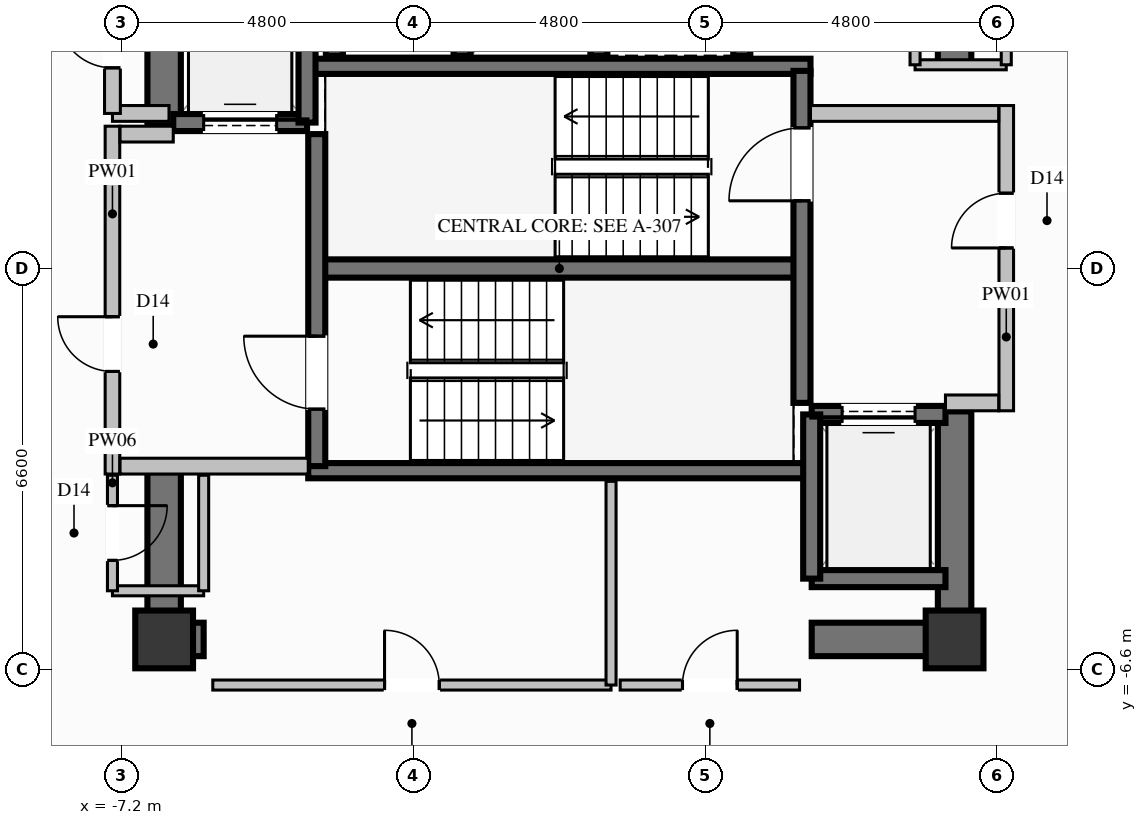
"""IFC4 building model, lengths in metres.
Left out: names, types, materials, properties, quantities, classifications, styles, units other than length and angle.
Written with IfcOpenShell. Run it as: python <this file> out.ifc"""

import sys

from ifc_helpers import new_model, si_unit, direction, frame, frame_2d, origin, origin_2d, place, context, subcontext, project, spatial, rectangle, extrude, element, fill, save


model = new_model("IFC4")
c1 = context("Model", 3, precision=1e-05, world=origin(), true_north=direction((0.0, 1.0)))
c2 = subcontext(c1, "Body", "Model", "MODEL_VIEW")
j1 = project(units=[si_unit("LENGTHUNIT", "METRE"), si_unit("PLANEANGLEUNIT", "RADIAN")], contexts=[c1])
p1 = place(None, origin())
s1 = spatial("IfcSite", under=j1, at=p1, CompositionType="ELEMENT")
p2 = place(p1, origin())
s2 = spatial("IfcBuilding", under=s1, at=p2, CompositionType="ELEMENT")
p3 = place(p2, frame((0.0, 0.0, 230.8)))
s3 = spatial("IfcBuildingStorey", under=s2, at=p3, CompositionType="ELEMENT", Elevation=230.8)
for number, where, z_axis, x_axis in (
    (1, (-6.5, -6.1, 0.0), (0.0, 0.0, 1.0), (1.0, 0.0, 0.0)),
    (2, (6.5, -6.1, 0.0), (0.0, 0.0, 1.0), (1.0, 0.0, 0.0)),
):
    element("IfcColumn", number, at=place(p3, frame(where, z_axis=z_axis, x_axis=x_axis)), inside=s3, PredefinedType="COLUMN", context=c2, shape_type="SweptSolid", body=[
        extrude(rectangle(XDim=0.95, YDim=0.95, at=origin_2d()), origin(), (0.0, 0.0, 1.0), 3.6),
    ])
p4 = place(p3, frame((-3.99, 0.0, 0.0), z_axis=(0.0, 0.0, 1.0), x_axis=(1.0, 0.0, 0.0)))
e3 = element("IfcWall", 3, at=p4, inside=s3, PredefinedType="SHEAR", context=c2, shape_type="SweptSolid", body=[
    extrude(rectangle(XDim=7.98, YDim=0.3, at=frame_2d((3.99, 0.0))), origin(), (0.0, 0.0, 1.0), 3.6),
])
for number, where, z_axis, x_axis in (
    (4, (-4.13, -3.325, 0.0), (0.0, 0.0, 1.0), (1.0, 0.0, 0.0)),
    (5, (-4.13, 3.325, 0.0), (0.0, 0.0, 1.0), (1.0, 0.0, 0.0)),
):
    element("IfcWall", number, at=place(p3, frame(where, z_axis=z_axis, x_axis=x_axis)), inside=s3, PredefinedType="SOLIDWALL", context=c2, shape_type="SweptSolid", body=[
        extrude(rectangle(XDim=8.26, YDim=0.25, at=frame_2d((4.13, 0.0))), origin(), (0.0, 0.0, 1.0), 3.6),
    ])
p5 = place(p3, frame((-6.225, -6.1, 0.0), z_axis=(0.0, 0.0, 1.0), x_axis=(1.0, 0.0, 0.0)))
e6 = element("IfcWall", 6, at=p5, inside=s3, PredefinedType="SHEAR", context=c2, shape_type="SweptSolid", body=[
    extrude(rectangle(XDim=0.375, YDim=0.55, at=frame_2d((0.188, 0.0))), origin(), (0.0, 0.0, 1.0), 3.6),
])
p6 = place(p3, frame((4.15, -6.1, 0.0), z_axis=(0.0, 0.0, 1.0), x_axis=(1.0, 0.0, 0.0)))
e7 = element("IfcWall", 7, at=p6, inside=s3, PredefinedType="SHEAR", context=c2, shape_type="SweptSolid", body=[
    extrude(rectangle(XDim=2.075, YDim=0.55, at=frame_2d((1.038, 0.0))), origin(), (0.0, 0.0, 1.0), 3.6),
])
p7 = place(p3, frame((-6.5, 2.35, 0.0), z_axis=(0.0, 0.0, 1.0), x_axis=(0.0, 1.0, 0.0)))
e8 = element("IfcWall", 8, at=p7, inside=s3, PredefinedType="SHEAR", context=c2, shape_type="SweptSolid", body=[
    extrude(rectangle(XDim=4.025, YDim=0.55, at=frame_2d((2.012, 0.0))), origin(), (0.0, 0.0, 1.0), 3.6),
])
p8 = place(p3, frame((-6.5, -6.375, 0.0), z_axis=(0.0, 0.0, 1.0), x_axis=(0.0, 1.0, 0.0)))
e9 = element("IfcWall", 9, at=p8, inside=s3, PredefinedType="SHEAR", context=c2, shape_type="SweptSolid", body=[
    extrude(rectangle(XDim=3.025, YDim=0.55, at=frame_2d((1.512, 0.0))), origin(), (0.0, 0.0, 1.0), 3.6),
])
p9 = place(p3, frame((6.5, -6.375, 0.0), z_axis=(0.0, 0.0, 1.0), x_axis=(0.0, 1.0, 0.0)))
e10 = element("IfcWall", 10, at=p9, inside=s3, PredefinedType="SHEAR", context=c2, shape_type="SweptSolid", body=[
    extrude(rectangle(XDim=4.025, YDim=0.55, at=frame_2d((2.012, 0.0))), origin(), (0.0, 0.0, 1.0), 3.6),
])
p10 = place(p3, frame((6.5, 3.35, 0.0), z_axis=(0.0, 0.0, 1.0), x_axis=(0.0, 1.0, 0.0)))
e11 = element("IfcWall", 11, at=p10, inside=s3, PredefinedType="SHEAR", context=c2, shape_type="SweptSolid", body=[
    extrude(rectangle(XDim=3.025, YDim=0.55, at=frame_2d((1.512, 0.0))), origin(), (0.0, 0.0, 1.0), 3.6),
])
for number, where, z_axis, x_axis in (
    (12, (-3.7, 6.0, 0.0), (0.0, 0.0, 1.0), (0.0, -1.0, 0.0)),
    (13, (-1.6, 3.5, 0.0), (0.0, 0.0, 1.0), (0.0, 1.0, 0.0)),
    (14, (0.65, 3.5, 0.0), (0.0, 0.0, 1.0), (0.0, 1.0, 0.0)),
    (15, (3.0, 3.5, 0.0), (0.0, 0.0, 1.0), (0.0, 1.0, 0.0)),
):
    element("IfcWall", number, at=place(p3, frame(where, z_axis=z_axis, x_axis=x_axis)), inside=s3, PredefinedType="SOLIDWALL", context=c2, shape_type="SweptSolid", body=[
        extrude(rectangle(XDim=2.5, YDim=0.28, at=frame_2d((1.25, 0.0))), origin(), (0.0, 0.0, 1.0), 3.2),
    ])
p11 = place(p3, frame((-6.35, 2.4, 0.0), z_axis=(0.0, 0.0, 1.0), x_axis=(1.0, 0.0, 0.0)))
e16 = element("IfcWall", 16, at=p11, inside=s3, PredefinedType="SOLIDWALL", context=c2, shape_type="SweptSolid", body=[
    extrude(rectangle(XDim=2.2, YDim=0.28, at=frame_2d((1.1, 0.0))), origin(), (0.0, 0.0, 1.0), 3.2),
])
p12 = place(p11, frame((0.5, 0.0, 0.0)))
e17 = element("IfcOpeningElement", 17, at=p12, cuts=e16, PredefinedType="OPENING", context=c2, shape_type="SweptSolid", body=[
    extrude(rectangle(XDim=1.2, YDim=2.2, at=frame_2d((0.6, 1.1))), frame((0.0, 0.15, 0.0), z_axis=(0.0, -1.0, 0.0), x_axis=(1.0, 0.0, 0.0)), (0.0, 0.0, 1.0), 0.3),
])
p13 = place(p3, frame((-4.15, 2.4, 0.0), z_axis=(0.0, 0.0, 1.0), x_axis=(0.0, 1.0, 0.0)))
e18 = element("IfcWall", 18, at=p13, inside=s3, PredefinedType="SOLIDWALL", context=c2, shape_type="SweptSolid", body=[
    extrude(rectangle(XDim=2.7, YDim=0.28, at=frame_2d((1.35, 0.0))), origin(), (0.0, 0.0, 1.0), 3.2),
])
p14 = place(p3, frame((4.15, -5.1, 0.0), z_axis=(0.0, 0.0, 1.0), x_axis=(1.0, 0.0, 0.0)))
e19 = element("IfcWall", 19, at=p14, inside=s3, PredefinedType="SOLIDWALL", context=c2, shape_type="SweptSolid", body=[
    extrude(rectangle(XDim=2.2, YDim=0.28, at=frame_2d((1.1, 0.0))), origin(), (0.0, 0.0, 1.0), 3.2),
])
p15 = place(p3, frame((6.35, -2.4, 0.0), z_axis=(0.0, 0.0, 1.0), x_axis=(-1.0, 0.0, 0.0)))
e20 = element("IfcWall", 20, at=p15, inside=s3, PredefinedType="SOLIDWALL", context=c2, shape_type="SweptSolid", body=[
    extrude(rectangle(XDim=2.2, YDim=0.28, at=frame_2d((1.1, 0.0))), origin(), (0.0, 0.0, 1.0), 3.2),
])
p16 = place(p15, frame((0.5, 0.0, 0.0)))
e21 = element("IfcOpeningElement", 21, at=p16, cuts=e20, PredefinedType="OPENING", context=c2, shape_type="SweptSolid", body=[
    extrude(rectangle(XDim=1.2, YDim=2.2, at=frame_2d((0.6, 1.1))), frame((0.0, 0.15, 0.0), z_axis=(0.0, -1.0, 0.0), x_axis=(1.0, 0.0, 0.0)), (0.0, 0.0, 1.0), 0.3),
])
p17 = place(p3, frame((4.15, -2.4, 0.0), z_axis=(0.0, 0.0, 1.0), x_axis=(0.0, -1.0, 0.0)))
e22 = element("IfcWall", 22, at=p17, inside=s3, PredefinedType="SOLIDWALL", context=c2, shape_type="SweptSolid", body=[
    extrude(rectangle(XDim=2.7, YDim=0.28, at=frame_2d((1.35, 0.0))), origin(), (0.0, 0.0, 1.0), 3.2),
])
p18 = place(p3, frame((-3.99, -3.25, 0.0), z_axis=(0.0, 0.0, 1.0), x_axis=(0.0, 1.0, 0.0)))
e23 = element("IfcWall", 23, at=p18, inside=s3, PredefinedType="SOLIDWALL", context=c2, shape_type="SweptSolid", body=[
    extrude(rectangle(XDim=5.46, YDim=0.28, at=frame_2d((2.73, 0.0))), origin(), (0.0, 0.0, 1.0), 3.2),
])
p19 = place(p18, frame((0.937, 0.0, 0.0)))
e24 = element("IfcOpeningElement", 24, at=p19, cuts=e23, PredefinedType="OPENING", context=c2, shape_type="SweptSolid", body=[
    extrude(rectangle(XDim=1.2, YDim=2.2, at=frame_2d((0.6, 1.1))), frame((0.0, 0.15, 0.0), z_axis=(0.0, -1.0, 0.0), x_axis=(1.0, 0.0, 0.0)), (0.0, 0.0, 1.0), 0.3),
])
p20 = place(p3, frame((3.99, -2.21, 0.0), z_axis=(0.0, 0.0, 1.0), x_axis=(0.0, 1.0, 0.0)))
e25 = element("IfcWall", 25, at=p20, inside=s3, PredefinedType="SOLIDWALL", context=c2, shape_type="SweptSolid", body=[
    extrude(rectangle(XDim=5.46, YDim=0.28, at=frame_2d((2.73, 0.0))), origin(), (0.0, 0.0, 1.0), 3.2),
])
p21 = place(p20, frame((3.323, 0.0, 0.0)))
e26 = element("IfcOpeningElement", 26, at=p21, cuts=e25, PredefinedType="OPENING", context=c2, shape_type="SweptSolid", body=[
    extrude(rectangle(XDim=1.2, YDim=2.2, at=frame_2d((0.6, 1.1))), frame((0.0, 0.15, 0.0), z_axis=(0.0, -1.0, 0.0), x_axis=(1.0, 0.0, 0.0)), (0.0, 0.0, 1.0), 0.3),
])
p22 = place(p3, frame((-7.35, -3.38, 0.0), z_axis=(0.0, 0.0, 1.0), x_axis=(0.0, 1.0, 0.0)))
e27 = element("IfcWall", 27, at=p22, inside=s3, PredefinedType="PARTITIONING", context=c2, shape_type="SweptSolid", body=[
    extrude(rectangle(XDim=5.72, YDim=0.24, at=frame_2d((2.86, 0.0))), origin(), (0.0, 0.0, 1.0), 3.2),
])
p23 = place(p22, frame((1.687, 0.0, 0.0)))
e28 = element("IfcOpeningElement", 28, at=p23, cuts=e27, PredefinedType="OPENING", context=c2, shape_type="SweptSolid", body=[
    extrude(rectangle(XDim=0.9, YDim=2.02, at=frame_2d((0.45, 1.01))), frame((0.0, 0.13, 0.0), z_axis=(0.0, -1.0, 0.0), x_axis=(1.0, 0.0, 0.0)), (0.0, 0.0, 1.0), 0.26),
])
p24 = place(p3, frame((-7.225, -3.25, 0.0), z_axis=(0.0, 0.0, 1.0), x_axis=(1.0, 0.0, 0.0)))
e29 = element("IfcWall", 29, at=p24, inside=s3, PredefinedType="PARTITIONING", context=c2, shape_type="SweptSolid", body=[
    extrude(rectangle(XDim=3.095, YDim=0.26, at=frame_2d((1.548, 0.0))), origin(), (0.0, 0.0, 1.0), 3.2),
])
p25 = place(p3, frame((-7.225, 2.21, 0.0), z_axis=(0.0, 0.0, 1.0), x_axis=(1.0, 0.0, 0.0)))
e30 = element("IfcWall", 30, at=p25, inside=s3, PredefinedType="PARTITIONING", context=c2, shape_type="SweptSolid", body=[
    extrude(rectangle(XDim=0.875, YDim=0.26, at=frame_2d((0.438, 0.0))), origin(), (0.0, 0.0, 1.0), 3.2),
])
p26 = place(p3, frame((7.35, -2.34, 0.0), z_axis=(0.0, 0.0, 1.0), x_axis=(0.0, 1.0, 0.0)))
e31 = element("IfcWall", 31, at=p26, inside=s3, PredefinedType="PARTITIONING", context=c2, shape_type="SweptSolid", body=[
    extrude(rectangle(XDim=5.02, YDim=0.24, at=frame_2d((2.51, 0.0))), origin(), (0.0, 0.0, 1.0), 3.2),
])
p27 = place(p26, frame((2.678, 0.0, 0.0)))
e32 = element("IfcOpeningElement", 32, at=p27, cuts=e31, PredefinedType="OPENING", context=c2, shape_type="SweptSolid", body=[
    extrude(rectangle(XDim=0.9, YDim=2.02, at=frame_2d((0.45, 1.01))), frame((0.0, 0.13, 0.0), z_axis=(0.0, -1.0, 0.0), x_axis=(1.0, 0.0, 0.0)), (0.0, 0.0, 1.0), 0.26),
])
p28 = place(p3, frame((6.35, -2.21, 0.0), z_axis=(0.0, 0.0, 1.0), x_axis=(1.0, 0.0, 0.0)))
e33 = element("IfcWall", 33, at=p28, inside=s3, PredefinedType="PARTITIONING", context=c2, shape_type="SweptSolid", body=[
    extrude(rectangle(XDim=0.875, YDim=0.26, at=frame_2d((0.438, 0.0))), origin(), (0.0, 0.0, 1.0), 3.2),
])
p29 = place(p3, frame((4.13, 2.55, 0.0), z_axis=(0.0, 0.0, 1.0), x_axis=(1.0, 0.0, 0.0)))
e34 = element("IfcWall", 34, at=p29, inside=s3, PredefinedType="PARTITIONING", context=c2, shape_type="SweptSolid", body=[
    extrude(rectangle(XDim=3.095, YDim=0.26, at=frame_2d((1.548, 0.0))), origin(), (0.0, 0.0, 1.0), 3.2),
])
p30 = place(p3, frame((-7.35, 2.55, 0.0), z_axis=(0.0, 0.0, 1.0), x_axis=(1.0, 0.0, 0.0)))
e35 = element("IfcWall", 35, at=p30, inside=s3, PredefinedType="PARTITIONING", context=c2, shape_type="SweptSolid", body=[
    extrude(rectangle(XDim=0.93, YDim=0.26, at=frame_2d((0.465, 0.0))), origin(), (0.0, 0.0, 1.0), 3.2),
])
p31 = place(p3, frame((-7.35, 2.55, 0.0), z_axis=(0.0, 0.0, 1.0), x_axis=(0.0, 1.0, 0.0)))
e36 = element("IfcWall", 36, at=p31, inside=s3, PredefinedType="PARTITIONING", context=c2, shape_type="SweptSolid", body=[
    extrude(rectangle(XDim=2.4, YDim=0.26, at=frame_2d((1.2, 0.0))), origin(), (0.0, 0.0, 1.0), 3.2),
])
p32 = place(p31, frame((0.75, 0.0, 0.0)))
e37 = element("IfcOpeningElement", 37, at=p32, cuts=e36, PredefinedType="OPENING", context=c2, shape_type="SweptSolid", body=[
    extrude(rectangle(XDim=0.9, YDim=2.02, at=frame_2d((0.45, 1.01))), frame((0.0, 0.14, 0.0), z_axis=(0.0, -1.0, 0.0), x_axis=(1.0, 0.0, 0.0)), (0.0, 0.0, 1.0), 0.28),
])
p33 = place(p3, frame((-7.35, -5.3, 0.0), z_axis=(0.0, 0.0, 1.0), x_axis=(1.0, 0.0, 0.0)))
e38 = element("IfcWall", 38, at=p33, inside=s3, PredefinedType="PARTITIONING", context=c2, shape_type="SweptSolid", body=[
    extrude(rectangle(XDim=1.5, YDim=0.165, at=frame_2d((0.75, 0.0))), origin(), (0.0, 0.0, 1.0), 3.2),
])
p34 = place(p3, frame((-5.85, -5.3, 0.0), z_axis=(0.0, 0.0, 1.0), x_axis=(0.0, 1.0, 0.0)))
e39 = element("IfcWall", 39, at=p34, inside=s3, PredefinedType="PARTITIONING", context=c2, shape_type="SweptSolid", body=[
    extrude(rectangle(XDim=1.9, YDim=0.165, at=frame_2d((0.95, 0.0))), origin(), (0.0, 0.0, 1.0), 2.067),
])
p35 = place(p3, frame((-7.35, -3.4, 0.0), z_axis=(0.0, 0.0, 1.0), x_axis=(0.0, -1.0, 0.0)))
e40 = element("IfcWall", 40, at=p35, inside=s3, PredefinedType="PARTITIONING", context=c2, shape_type="SweptSolid", body=[
    extrude(rectangle(XDim=1.9, YDim=0.165, at=frame_2d((0.95, 0.0))), origin(), (0.0, 0.0, 1.0), 3.2),
])
p36 = place(p35, frame((0.5, 0.0, 0.0)))
e41 = element("IfcOpeningElement", 41, at=p36, cuts=e40, PredefinedType="OPENING", context=c2, shape_type="SweptSolid", body=[
    extrude(rectangle(XDim=0.9, YDim=2.02, at=frame_2d((0.45, 1.01))), frame((0.0, 0.093, 0.0), z_axis=(0.0, -1.0, 0.0), x_axis=(1.0, 0.0, 0.0)), (0.0, 0.0, 1.0), 0.185),
])
p37 = place(p3, frame((5.85, 3.35, 0.0), z_axis=(0.0, 0.0, 1.0), x_axis=(1.0, 0.0, 0.0)))
e42 = element("IfcWall", 42, at=p37, inside=s3, PredefinedType="PARTITIONING", context=c2, shape_type="SweptSolid", body=[
    extrude(rectangle(XDim=1.5, YDim=0.165, at=frame_2d((0.75, 0.0))), origin(), (0.0, 0.0, 1.0), 3.2),
])
p38 = place(p3, frame((7.35, 3.35, 0.0), z_axis=(0.0, 0.0, 1.0), x_axis=(0.0, 1.0, 0.0)))
e43 = element("IfcWall", 43, at=p38, inside=s3, PredefinedType="PARTITIONING", context=c2, shape_type="SweptSolid", body=[
    extrude(rectangle(XDim=1.95, YDim=0.165, at=frame_2d((0.975, 0.0))), origin(), (0.0, 0.0, 1.0), 3.2),
])
p39 = place(p38, frame((0.525, 0.0, 0.0)))
e44 = element("IfcOpeningElement", 44, at=p39, cuts=e43, PredefinedType="OPENING", context=c2, shape_type="SweptSolid", body=[
    extrude(rectangle(XDim=0.9, YDim=2.02, at=frame_2d((0.45, 1.01))), frame((0.0, 0.093, 0.0), z_axis=(0.0, -1.0, 0.0), x_axis=(1.0, 0.0, 0.0)), (0.0, 0.0, 1.0), 0.185),
])
p40 = place(p3, frame((5.85, 5.3, 0.0), z_axis=(0.0, 0.0, 1.0), x_axis=(0.0, -1.0, 0.0)))
e45 = element("IfcWall", 45, at=p40, inside=s3, PredefinedType="PARTITIONING", context=c2, shape_type="SweptSolid", body=[
    extrude(rectangle(XDim=1.95, YDim=0.165, at=frame_2d((0.975, 0.0))), origin(), (0.0, 0.0, 1.0), 2.067),
])
p41 = place(p3, frame((-5.7, -6.85, 0.0), z_axis=(0.0, 0.0, 1.0), x_axis=(1.0, 0.0, 0.0)))
e46 = element("IfcWall", 46, at=p41, inside=s3, PredefinedType="PARTITIONING", context=c2, shape_type="SweptSolid", body=[
    extrude(rectangle(XDim=6.55, YDim=0.165, at=frame_2d((3.275, 0.0))), origin(), (0.0, 0.0, 1.0), 3.2),
])
p42 = place(p41, frame((2.825, 0.0, 0.0)))
e47 = element("IfcOpeningElement", 47, at=p42, cuts=e46, PredefinedType="OPENING", context=c2, shape_type="SweptSolid", body=[
    extrude(rectangle(XDim=0.9, YDim=2.02, at=frame_2d((0.45, 1.01))), frame((0.0, 0.093, 0.0), z_axis=(0.0, -1.0, 0.0), x_axis=(1.0, 0.0, 0.0)), (0.0, 0.0, 1.0), 0.185),
])
p43 = place(p3, frame((0.85, -6.85, 0.0), z_axis=(0.0, 0.0, 1.0), x_axis=(0.0, 1.0, 0.0)))
e48 = element("IfcWall", 48, at=p43, inside=s3, PredefinedType="PARTITIONING", context=c2, shape_type="SweptSolid", body=[
    extrude(rectangle(XDim=3.35, YDim=0.165, at=frame_2d((1.675, 0.0))), origin(), (0.0, 0.0, 1.0), 3.2),
])
p44 = place(p3, frame((1.0, -6.85, 0.0), z_axis=(0.0, 0.0, 1.0), x_axis=(1.0, 0.0, 0.0)))
e49 = element("IfcWall", 49, at=p44, inside=s3, PredefinedType="PARTITIONING", context=c2, shape_type="SweptSolid", body=[
    extrude(rectangle(XDim=2.95, YDim=0.165, at=frame_2d((1.475, 0.0))), origin(), (0.0, 0.0, 1.0), 3.2),
])
p45 = place(p44, frame((1.025, 0.0, 0.0)))
e50 = element("IfcOpeningElement", 50, at=p45, cuts=e49, PredefinedType="OPENING", context=c2, shape_type="SweptSolid", body=[
    extrude(rectangle(XDim=0.9, YDim=2.02, at=frame_2d((0.45, 1.01))), frame((0.0, 0.093, 0.0), z_axis=(0.0, -1.0, 0.0), x_axis=(1.0, 0.0, 0.0)), (0.0, 0.0, 1.0), 0.185),
])
p46 = place(p12, origin())
e51 = element("IfcDoor", 51, at=p46, inside=s3, OperationType="SLIDING_TO_LEFT", PredefinedType="DOOR", context=c2, shape_type="SweptSolid", body=[
    extrude(rectangle(XDim=1.2, YDim=2.2, at=frame_2d((0.6, 1.1))), frame((0.0, 0.025, 0.0), z_axis=(0.0, -1.0, 0.0), x_axis=(1.0, 0.0, 0.0)), (0.0, 0.0, 1.0), 0.05),
])
fill(e17, e51)
p47 = place(p16, origin())
e52 = element("IfcDoor", 52, at=p47, inside=s3, OperationType="SLIDING_TO_LEFT", PredefinedType="DOOR", context=c2, shape_type="SweptSolid", body=[
    extrude(rectangle(XDim=1.2, YDim=2.2, at=frame_2d((0.6, 1.1))), frame((0.0, 0.025, 0.0), z_axis=(0.0, -1.0, 0.0), x_axis=(1.0, 0.0, 0.0)), (0.0, 0.0, 1.0), 0.05),
])
fill(e21, e52)
p48 = place(p19, origin())
e53 = element("IfcDoor", 53, at=p48, inside=s3, OperationType="SINGLE_SWING_RIGHT", PredefinedType="DOOR", context=c2, shape_type="SweptSolid", body=[
    extrude(rectangle(XDim=1.2, YDim=2.2, at=frame_2d((0.6, 1.1))), frame((0.0, 0.025, 0.0), z_axis=(0.0, -1.0, 0.0), x_axis=(1.0, 0.0, 0.0)), (0.0, 0.0, 1.0), 0.05),
])
fill(e24, e53)
p49 = place(p21, origin())
e54 = element("IfcDoor", 54, at=p49, inside=s3, OperationType="SINGLE_SWING_LEFT", PredefinedType="DOOR", context=c2, shape_type="SweptSolid", body=[
    extrude(rectangle(XDim=1.2, YDim=2.2, at=frame_2d((0.6, 1.1))), frame((0.0, 0.025, 0.0), z_axis=(0.0, -1.0, 0.0), x_axis=(1.0, 0.0, 0.0)), (0.0, 0.0, 1.0), 0.05),
])
fill(e26, e54)
p50 = place(p23, origin())
e55 = element("IfcDoor", 55, at=p50, inside=s3, OperationType="SINGLE_SWING_RIGHT", PredefinedType="DOOR", context=c2, shape_type="SweptSolid", body=[
    extrude(rectangle(XDim=0.9, YDim=2.02, at=frame_2d((0.45, 1.01))), frame((0.0, 0.025, 0.0), z_axis=(0.0, -1.0, 0.0), x_axis=(1.0, 0.0, 0.0)), (0.0, 0.0, 1.0), 0.05),
])
fill(e28, e55)
p51 = place(p27, origin())
e56 = element("IfcDoor", 56, at=p51, inside=s3, OperationType="SINGLE_SWING_LEFT", PredefinedType="DOOR", context=c2, shape_type="SweptSolid", body=[
    extrude(rectangle(XDim=0.9, YDim=2.02, at=frame_2d((0.45, 1.01))), frame((0.0, 0.025, 0.0), z_axis=(0.0, -1.0, 0.0), x_axis=(1.0, 0.0, 0.0)), (0.0, 0.0, 1.0), 0.05),
])
fill(e32, e56)
p52 = place(p32, origin())
e57 = element("IfcDoor", 57, at=p52, inside=s3, OperationType="SINGLE_SWING_RIGHT", PredefinedType="DOOR", context=c2, shape_type="SweptSolid", body=[
    extrude(rectangle(XDim=0.9, YDim=2.02, at=frame_2d((0.45, 1.01))), frame((0.0, 0.025, 0.0), z_axis=(0.0, -1.0, 0.0), x_axis=(1.0, 0.0, 0.0)), (0.0, 0.0, 1.0), 0.05),
])
fill(e37, e57)
p53 = place(p36, origin())
e58 = element("IfcDoor", 58, at=p53, inside=s3, OperationType="SINGLE_SWING_LEFT", PredefinedType="DOOR", context=c2, shape_type="SweptSolid", body=[
    extrude(rectangle(XDim=0.9, YDim=2.02, at=frame_2d((0.45, 1.01))), frame((0.0, 0.025, 0.0), z_axis=(0.0, -1.0, 0.0), x_axis=(1.0, 0.0, 0.0)), (0.0, 0.0, 1.0), 0.05),
])
fill(e41, e58)
p54 = place(p42, origin())
e59 = element("IfcDoor", 59, at=p54, inside=s3, OperationType="SINGLE_SWING_LEFT", PredefinedType="DOOR", context=c2, shape_type="SweptSolid", body=[
    extrude(rectangle(XDim=0.9, YDim=2.02, at=frame_2d((0.45, 1.01))), frame((0.0, 0.025, 0.0), z_axis=(0.0, -1.0, 0.0), x_axis=(1.0, 0.0, 0.0)), (0.0, 0.0, 1.0), 0.05),
])
fill(e47, e59)
p55 = place(p45, origin())
e60 = element("IfcDoor", 60, at=p55, inside=s3, OperationType="SINGLE_SWING_RIGHT", PredefinedType="DOOR", context=c2, shape_type="SweptSolid", body=[
    extrude(rectangle(XDim=0.9, YDim=2.02, at=frame_2d((0.45, 1.01))), frame((0.0, 0.025, 0.0), z_axis=(0.0, -1.0, 0.0), x_axis=(1.0, 0.0, 0.0)), (0.0, 0.0, 1.0), 0.05),
])
fill(e50, e60)
save(model, sys.argv[1])
